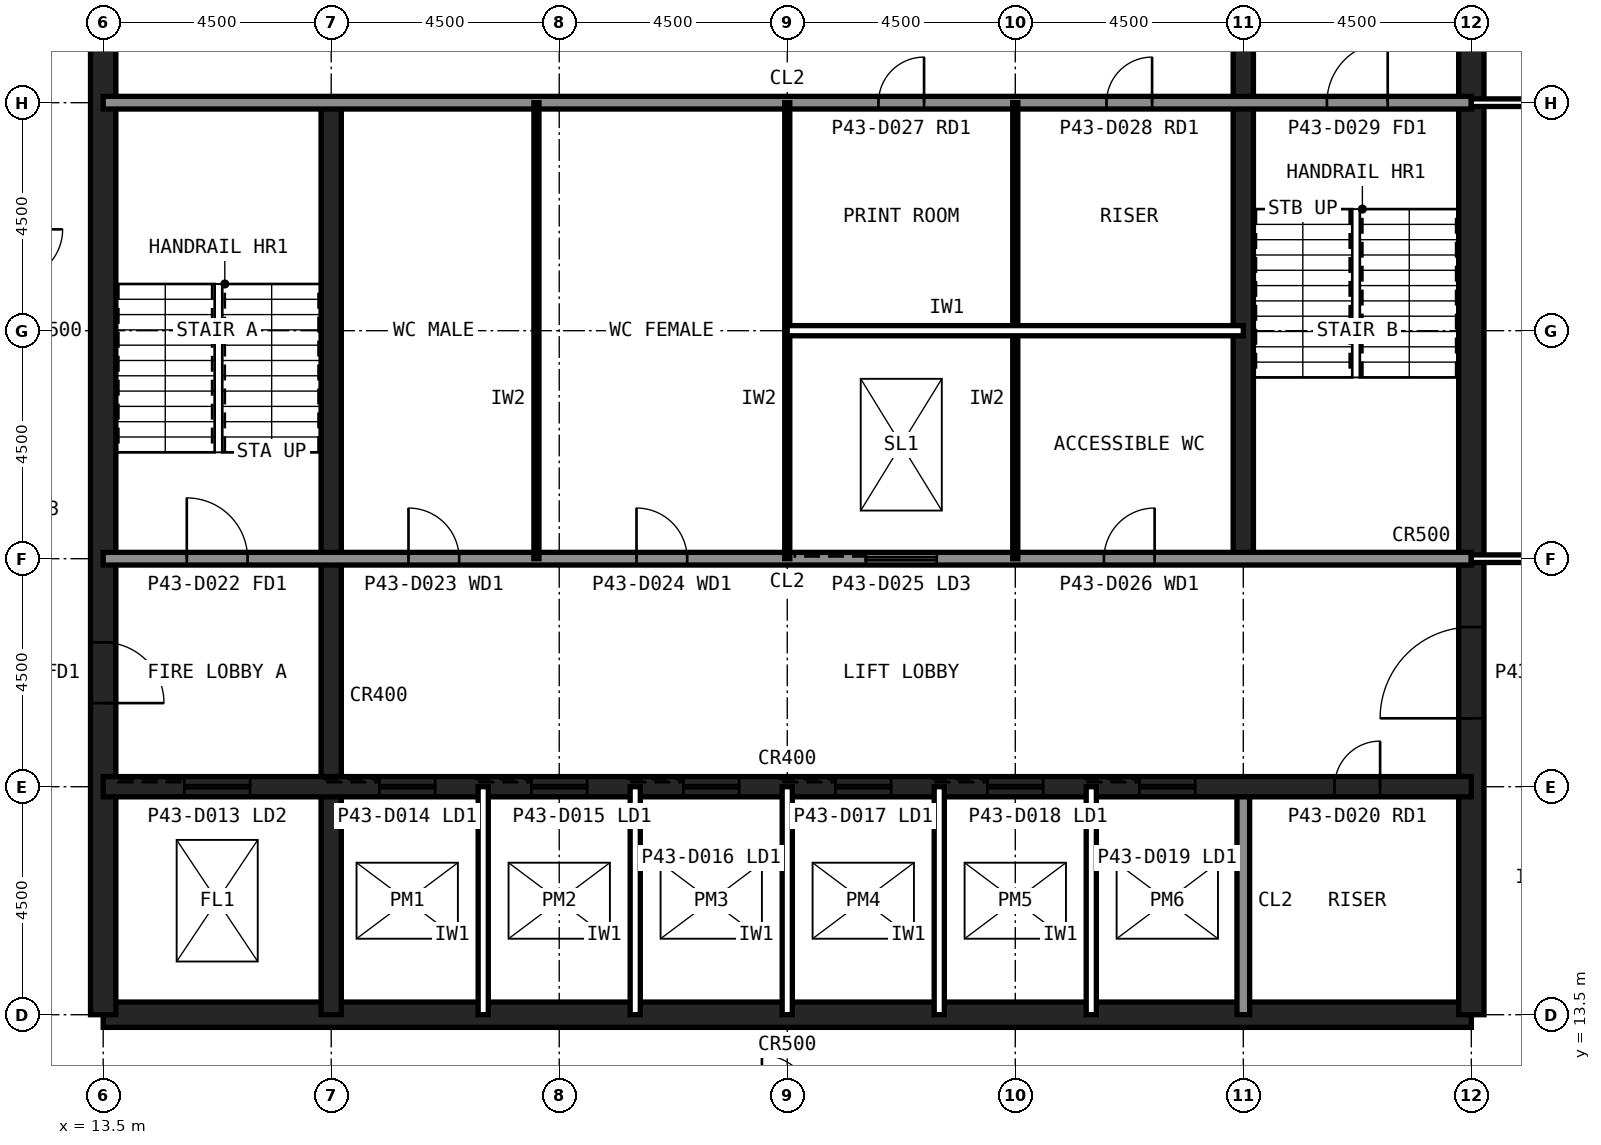
"""IFC4 building model, lengths in metres.
Left out: names, types, materials, properties, quantities, classifications, styles, units other than length and angle.
Written with IfcOpenShell. Run it as: python <this file> out.ifc"""

import sys

from ifc_helpers import new_model, si_unit, direction, frame, frame_2d, origin, place, context, subcontext, project, spatial, rectangle, extrude, element, fill, save


model = new_model("IFC4")
c1 = context("Model", 3, precision=1e-05, world=origin(), true_north=direction((0.0, 1.0)))
c2 = subcontext(c1, "Body", "Model", "MODEL_VIEW")
j1 = project(units=[si_unit("LENGTHUNIT", "METRE"), si_unit("PLANEANGLEUNIT", "RADIAN")], contexts=[c1])
p1 = place(None, origin())
s1 = spatial("IfcSite", under=j1, at=p1, CompositionType="ELEMENT")
p2 = place(p1, origin())
s2 = spatial("IfcBuilding", under=s1, at=p2, CompositionType="ELEMENT")
p3 = place(p2, frame((0.0, 0.0, 183.6)))
s3 = spatial("IfcBuildingStorey", under=s2, at=p3, CompositionType="ELEMENT", Elevation=183.6)
p4 = place(p3, frame((13.5, 13.5, 0.0), z_axis=(0.0, 0.0, 1.0), x_axis=(1.0, 0.0, 0.0)))
e1 = element("IfcWall", 1, at=p4, inside=s3, PredefinedType="SHEAR", context=c2, shape_type="SweptSolid", body=[
    extrude(rectangle(XDim=27.0, YDim=0.5, at=frame_2d((13.5, 0.0))), origin(), (0.0, 0.0, 1.0), 4.0),
])
p5 = place(p3, frame((40.5, 13.5, 0.0), z_axis=(0.0, 0.0, 1.0), x_axis=(0.0, 1.0, 0.0)))
e2 = element("IfcWall", 2, at=p5, inside=s3, PredefinedType="SHEAR", context=c2, shape_type="SweptSolid", body=[
    extrude(rectangle(XDim=27.0, YDim=0.5, at=frame_2d((13.5, 0.0))), origin(), (0.0, 0.0, 1.0), 4.0),
])
p6 = place(p5, frame((5.85, 0.0, 0.0)))
e3 = element("IfcOpeningElement", 3, at=p6, cuts=e2, PredefinedType="OPENING", context=c2, shape_type="SweptSolid", body=[
    extrude(rectangle(XDim=1.8, YDim=2.1, at=frame_2d((0.9, 1.05))), frame((0.0, 0.26, 0.0), z_axis=(0.0, -1.0, 0.0), x_axis=(1.0, 0.0, 0.0)), (0.0, 0.0, 1.0), 0.52),
])
p7 = place(p5, frame((19.65, 0.0, 0.0)))
e4 = element("IfcOpeningElement", 4, at=p7, cuts=e2, PredefinedType="OPENING", context=c2, shape_type="SweptSolid", body=[
    extrude(rectangle(XDim=1.2, YDim=2.1, at=frame_2d((0.6, 1.05))), frame((0.0, 0.26, 0.0), z_axis=(0.0, -1.0, 0.0), x_axis=(1.0, 0.0, 0.0)), (0.0, 0.0, 1.0), 0.52),
])
p8 = place(p3, frame((13.5, 40.5, 0.0), z_axis=(0.0, 0.0, 1.0), x_axis=(0.0, -1.0, 0.0)))
e5 = element("IfcWall", 5, at=p8, inside=s3, PredefinedType="SHEAR", context=c2, shape_type="SweptSolid", body=[
    extrude(rectangle(XDim=27.0, YDim=0.5, at=frame_2d((13.5, 0.0))), origin(), (0.0, 0.0, 1.0), 4.0),
])
p9 = place(p8, frame((19.65, 0.0, 0.0)))
e6 = element("IfcOpeningElement", 6, at=p9, cuts=e5, PredefinedType="OPENING", context=c2, shape_type="SweptSolid", body=[
    extrude(rectangle(XDim=1.2, YDim=2.1, at=frame_2d((0.6, 1.05))), frame((0.0, 0.26, 0.0), z_axis=(0.0, -1.0, 0.0), x_axis=(1.0, 0.0, 0.0)), (0.0, 0.0, 1.0), 0.52),
])
p10 = place(p8, frame((5.85, 0.0, 0.0)))
e7 = element("IfcOpeningElement", 7, at=p10, cuts=e5, PredefinedType="OPENING", context=c2, shape_type="SweptSolid", body=[
    extrude(rectangle(XDim=1.8, YDim=2.1, at=frame_2d((0.9, 1.05))), frame((0.0, 0.26, 0.0), z_axis=(0.0, -1.0, 0.0), x_axis=(1.0, 0.0, 0.0)), (0.0, 0.0, 1.0), 0.52),
])
p11 = place(p3, frame((18.0, 13.5, 0.0), z_axis=(0.0, 0.0, 1.0), x_axis=(0.0, 1.0, 0.0)))
e8 = element("IfcWall", 8, at=p11, inside=s3, PredefinedType="SHEAR", context=c2, shape_type="SweptSolid", body=[
    extrude(rectangle(XDim=18.0, YDim=0.4, at=frame_2d((9.0, 0.0))), origin(), (0.0, 0.0, 1.0), 4.0),
])
p12 = place(p3, frame((36.0, 13.5, 0.0), z_axis=(0.0, 0.0, 1.0), x_axis=(0.0, 1.0, 0.0)))
e9 = element("IfcWall", 9, at=p12, inside=s3, PredefinedType="SOLIDWALL", context=c2, shape_type="SweptSolid", body=[
    extrude(rectangle(XDim=4.5, YDim=0.25, at=frame_2d((2.25, 0.0))), origin(), (0.0, 0.0, 1.0), 3.84),
])
p13 = place(p3, frame((36.0, 22.5, 0.0), z_axis=(0.0, 0.0, 1.0), x_axis=(0.0, 1.0, 0.0)))
e10 = element("IfcWall", 10, at=p13, inside=s3, PredefinedType="SHEAR", context=c2, shape_type="SweptSolid", body=[
    extrude(rectangle(XDim=18.0, YDim=0.4, at=frame_2d((9.0, 0.0))), origin(), (0.0, 0.0, 1.0), 4.0),
])
p14 = place(p3, frame((13.5, 18.0, 0.0), z_axis=(0.0, 0.0, 1.0), x_axis=(1.0, 0.0, 0.0)))
e11 = element("IfcWall", 11, at=p14, inside=s3, PredefinedType="SHEAR", context=c2, shape_type="SweptSolid", body=[
    extrude(rectangle(XDim=27.0, YDim=0.4, at=frame_2d((13.5, 0.0))), origin(), (0.0, 0.0, 1.0), 4.0),
])
p15 = place(p14, frame((24.3, 0.0, 0.0)))
e12 = element("IfcOpeningElement", 12, at=p15, cuts=e11, PredefinedType="OPENING", context=c2, shape_type="SweptSolid", body=[
    extrude(rectangle(XDim=0.9, YDim=2.1, at=frame_2d((0.45, 1.05))), frame((0.0, 0.21, 0.0), z_axis=(0.0, -1.0, 0.0), x_axis=(1.0, 0.0, 0.0)), (0.0, 0.0, 1.0), 0.42),
])
p16 = place(p14, frame((5.45, 0.0, 0.0)))
e13 = element("IfcOpeningElement", 13, at=p16, cuts=e11, PredefinedType="OPENING", context=c2, shape_type="SweptSolid", body=[
    extrude(rectangle(XDim=1.1, YDim=2.1, at=frame_2d((0.55, 1.05))), frame((0.0, 0.21, 0.0), z_axis=(0.0, -1.0, 0.0), x_axis=(1.0, 0.0, 0.0)), (0.0, 0.0, 1.0), 0.42),
])
p17 = place(p14, frame((8.45, 0.0, 0.0)))
e14 = element("IfcOpeningElement", 14, at=p17, cuts=e11, PredefinedType="OPENING", context=c2, shape_type="SweptSolid", body=[
    extrude(rectangle(XDim=1.1, YDim=2.1, at=frame_2d((0.55, 1.05))), frame((0.0, 0.21, 0.0), z_axis=(0.0, -1.0, 0.0), x_axis=(1.0, 0.0, 0.0)), (0.0, 0.0, 1.0), 0.42),
])
p18 = place(p14, frame((11.45, 0.0, 0.0)))
e15 = element("IfcOpeningElement", 15, at=p18, cuts=e11, PredefinedType="OPENING", context=c2, shape_type="SweptSolid", body=[
    extrude(rectangle(XDim=1.1, YDim=2.1, at=frame_2d((0.55, 1.05))), frame((0.0, 0.21, 0.0), z_axis=(0.0, -1.0, 0.0), x_axis=(1.0, 0.0, 0.0)), (0.0, 0.0, 1.0), 0.42),
])
p19 = place(p14, frame((14.45, 0.0, 0.0)))
e16 = element("IfcOpeningElement", 16, at=p19, cuts=e11, PredefinedType="OPENING", context=c2, shape_type="SweptSolid", body=[
    extrude(rectangle(XDim=1.1, YDim=2.1, at=frame_2d((0.55, 1.05))), frame((0.0, 0.21, 0.0), z_axis=(0.0, -1.0, 0.0), x_axis=(1.0, 0.0, 0.0)), (0.0, 0.0, 1.0), 0.42),
])
p20 = place(p14, frame((17.45, 0.0, 0.0)))
e17 = element("IfcOpeningElement", 17, at=p20, cuts=e11, PredefinedType="OPENING", context=c2, shape_type="SweptSolid", body=[
    extrude(rectangle(XDim=1.1, YDim=2.1, at=frame_2d((0.55, 1.05))), frame((0.0, 0.21, 0.0), z_axis=(0.0, -1.0, 0.0), x_axis=(1.0, 0.0, 0.0)), (0.0, 0.0, 1.0), 0.42),
])
p21 = place(p14, frame((20.45, 0.0, 0.0)))
e18 = element("IfcOpeningElement", 18, at=p21, cuts=e11, PredefinedType="OPENING", context=c2, shape_type="SweptSolid", body=[
    extrude(rectangle(XDim=1.1, YDim=2.1, at=frame_2d((0.55, 1.05))), frame((0.0, 0.21, 0.0), z_axis=(0.0, -1.0, 0.0), x_axis=(1.0, 0.0, 0.0)), (0.0, 0.0, 1.0), 0.42),
])
p22 = place(p14, frame((1.6, 0.0, 0.0)))
e19 = element("IfcOpeningElement", 19, at=p22, cuts=e11, PredefinedType="OPENING", context=c2, shape_type="SweptSolid", body=[
    extrude(rectangle(XDim=1.3, YDim=2.2, at=frame_2d((0.65, 1.1))), frame((0.0, 0.21, 0.0), z_axis=(0.0, -1.0, 0.0), x_axis=(1.0, 0.0, 0.0)), (0.0, 0.0, 1.0), 0.42),
])
p23 = place(p3, frame((13.5, 22.5, 0.0), z_axis=(0.0, 0.0, 1.0), x_axis=(1.0, 0.0, 0.0)))
e20 = element("IfcWall", 20, at=p23, inside=s3, PredefinedType="SOLIDWALL", context=c2, shape_type="SweptSolid", body=[
    extrude(rectangle(XDim=27.0, YDim=0.25, at=frame_2d((13.5, 0.0))), origin(), (0.0, 0.0, 1.0), 3.84),
])
p24 = place(p23, frame((1.65, 0.0, 0.0)))
e21 = element("IfcOpeningElement", 21, at=p24, cuts=e20, PredefinedType="OPENING", context=c2, shape_type="SweptSolid", body=[
    extrude(rectangle(XDim=1.2, YDim=2.1, at=frame_2d((0.6, 1.05))), frame((0.0, 0.135, 0.0), z_axis=(0.0, -1.0, 0.0), x_axis=(1.0, 0.0, 0.0)), (0.0, 0.0, 1.0), 0.27),
])
p25 = place(p23, frame((6.025, 0.0, 0.0)))
e22 = element("IfcOpeningElement", 22, at=p25, cuts=e20, PredefinedType="OPENING", context=c2, shape_type="SweptSolid", body=[
    extrude(rectangle(XDim=1.0, YDim=2.1, at=frame_2d((0.5, 1.05))), frame((0.0, 0.135, 0.0), z_axis=(0.0, -1.0, 0.0), x_axis=(1.0, 0.0, 0.0)), (0.0, 0.0, 1.0), 0.27),
])
p26 = place(p23, frame((10.525, 0.0, 0.0)))
e23 = element("IfcOpeningElement", 23, at=p26, cuts=e20, PredefinedType="OPENING", context=c2, shape_type="SweptSolid", body=[
    extrude(rectangle(XDim=1.0, YDim=2.1, at=frame_2d((0.5, 1.05))), frame((0.0, 0.135, 0.0), z_axis=(0.0, -1.0, 0.0), x_axis=(1.0, 0.0, 0.0)), (0.0, 0.0, 1.0), 0.27),
])
p27 = place(p23, frame((19.75, 0.0, 0.0)))
e24 = element("IfcOpeningElement", 24, at=p27, cuts=e20, PredefinedType="OPENING", context=c2, shape_type="SweptSolid", body=[
    extrude(rectangle(XDim=1.0, YDim=2.1, at=frame_2d((0.5, 1.05))), frame((0.0, 0.135, 0.0), z_axis=(0.0, -1.0, 0.0), x_axis=(1.0, 0.0, 0.0)), (0.0, 0.0, 1.0), 0.27),
])
p28 = place(p23, frame((15.05, 0.0, 0.0)))
e25 = element("IfcOpeningElement", 25, at=p28, cuts=e20, PredefinedType="OPENING", context=c2, shape_type="SweptSolid", body=[
    extrude(rectangle(XDim=1.4, YDim=2.4, at=frame_2d((0.7, 1.2))), frame((0.0, 0.135, 0.0), z_axis=(0.0, -1.0, 0.0), x_axis=(1.0, 0.0, 0.0)), (0.0, 0.0, 1.0), 0.27),
])
p29 = place(p3, frame((13.5, 31.5, 0.0), z_axis=(0.0, 0.0, 1.0), x_axis=(1.0, 0.0, 0.0)))
e26 = element("IfcWall", 26, at=p29, inside=s3, PredefinedType="SOLIDWALL", context=c2, shape_type="SweptSolid", body=[
    extrude(rectangle(XDim=27.0, YDim=0.25, at=frame_2d((13.5, 0.0))), origin(), (0.0, 0.0, 1.0), 3.84),
])
p30 = place(p29, frame((24.15, 0.0, 0.0)))
e27 = element("IfcOpeningElement", 27, at=p30, cuts=e26, PredefinedType="OPENING", context=c2, shape_type="SweptSolid", body=[
    extrude(rectangle(XDim=1.2, YDim=2.1, at=frame_2d((0.6, 1.05))), frame((0.0, 0.135, 0.0), z_axis=(0.0, -1.0, 0.0), x_axis=(1.0, 0.0, 0.0)), (0.0, 0.0, 1.0), 0.27),
])
p31 = place(p29, frame((15.3, 0.0, 0.0)))
e28 = element("IfcOpeningElement", 28, at=p31, cuts=e26, PredefinedType="OPENING", context=c2, shape_type="SweptSolid", body=[
    extrude(rectangle(XDim=0.9, YDim=2.1, at=frame_2d((0.45, 1.05))), frame((0.0, 0.135, 0.0), z_axis=(0.0, -1.0, 0.0), x_axis=(1.0, 0.0, 0.0)), (0.0, 0.0, 1.0), 0.27),
])
p32 = place(p29, frame((19.8, 0.0, 0.0)))
e29 = element("IfcOpeningElement", 29, at=p32, cuts=e26, PredefinedType="OPENING", context=c2, shape_type="SweptSolid", body=[
    extrude(rectangle(XDim=0.9, YDim=2.1, at=frame_2d((0.45, 1.05))), frame((0.0, 0.135, 0.0), z_axis=(0.0, -1.0, 0.0), x_axis=(1.0, 0.0, 0.0)), (0.0, 0.0, 1.0), 0.27),
])
for number, where, z_axis, x_axis in (
    (30, (21.0, 13.5, 0.0), (0.0, 0.0, 1.0), (0.0, 1.0, 0.0)),
    (31, (24.0, 13.5, 0.0), (0.0, 0.0, 1.0), (0.0, 1.0, 0.0)),
    (32, (27.0, 13.5, 0.0), (0.0, 0.0, 1.0), (0.0, 1.0, 0.0)),
    (33, (30.0, 13.5, 0.0), (0.0, 0.0, 1.0), (0.0, 1.0, 0.0)),
    (34, (33.0, 13.5, 0.0), (0.0, 0.0, 1.0), (0.0, 1.0, 0.0)),
):
    element("IfcWall", number, at=place(p3, frame(where, z_axis=z_axis, x_axis=x_axis)), inside=s3, PredefinedType="PARTITIONING", context=c2, shape_type="SweptSolid", body=[
        extrude(rectangle(XDim=4.5, YDim=0.2, at=frame_2d((2.25, 0.0))), origin(), (0.0, 0.0, 1.0), 3.84),
    ])
for number, where, z_axis, x_axis in (
    (35, (22.05, 22.5, 0.0), (0.0, 0.0, 1.0), (0.0, 1.0, 0.0)),
    (36, (27.0, 22.5, 0.0), (0.0, 0.0, 1.0), (0.0, 1.0, 0.0)),
    (37, (31.5, 22.5, 0.0), (0.0, 0.0, 1.0), (0.0, 1.0, 0.0)),
):
    element("IfcWall", number, at=place(p3, frame(where, z_axis=z_axis, x_axis=x_axis)), inside=s3, PredefinedType="PLUMBINGWALL", context=c2, shape_type="SweptSolid", body=[
        extrude(rectangle(XDim=9.0, YDim=0.1, at=frame_2d((4.5, 0.0))), origin(), (0.0, 0.0, 1.0), 3.84),
    ])
p33 = place(p3, frame((27.0, 27.0, 0.0), z_axis=(0.0, 0.0, 1.0), x_axis=(1.0, 0.0, 0.0)))
e38 = element("IfcWall", 38, at=p33, inside=s3, PredefinedType="PARTITIONING", context=c2, shape_type="SweptSolid", body=[
    extrude(rectangle(XDim=9.0, YDim=0.2, at=frame_2d((4.5, 0.0))), origin(), (0.0, 0.0, 1.0), 3.84),
])
p34 = place(p3, frame((40.5, 22.5, 0.0), z_axis=(0.0, 0.0, 1.0), x_axis=(1.0, 0.0, 0.0)))
e39 = element("IfcWall", 39, at=p34, inside=s3, PredefinedType="PARTITIONING", context=c2, shape_type="SweptSolid", body=[
    extrude(rectangle(XDim=6.75, YDim=0.15, at=frame_2d((3.375, 0.0))), origin(), (0.0, 0.0, 1.0), 2.989),
])
p35 = place(p3, frame((47.25, 31.5, 0.0), z_axis=(0.0, 0.0, 1.0), x_axis=(-1.0, 0.0, 0.0)))
e40 = element("IfcWall", 40, at=p35, inside=s3, PredefinedType="PARTITIONING", context=c2, shape_type="SweptSolid", body=[
    extrude(rectangle(XDim=6.75, YDim=0.15, at=frame_2d((3.375, 0.0))), origin(), (0.0, 0.0, 1.0), 2.989),
])
p36 = place(p35, frame((2.875, 0.0, 0.0)))
e41 = element("IfcOpeningElement", 41, at=p36, cuts=e40, PredefinedType="OPENING", context=c2, shape_type="SweptSolid", body=[
    extrude(rectangle(XDim=1.0, YDim=2.1, at=frame_2d((0.5, 1.05))), frame((0.0, 0.085, 0.0), z_axis=(0.0, -1.0, 0.0), x_axis=(1.0, 0.0, 0.0)), (0.0, 0.0, 1.0), 0.17),
])
p37 = place(p9, origin())
e42 = element("IfcDoor", 42, at=p37, inside=s3, OperationType="SINGLE_SWING_RIGHT", PredefinedType="DOOR", context=c2, shape_type="SweptSolid", body=[
    extrude(rectangle(XDim=1.2, YDim=2.1, at=frame_2d((0.6, 1.05))), frame((0.0, 0.025, 0.0), z_axis=(0.0, -1.0, 0.0), x_axis=(1.0, 0.0, 0.0)), (0.0, 0.0, 1.0), 0.05),
])
fill(e6, e42)
p38 = place(p6, origin())
e43 = element("IfcDoor", 43, at=p38, inside=s3, OperationType="SINGLE_SWING_LEFT", PredefinedType="DOOR", context=c2, shape_type="SweptSolid", body=[
    extrude(rectangle(XDim=1.8, YDim=2.1, at=frame_2d((0.9, 1.05))), frame((0.0, 0.025, 0.0), z_axis=(0.0, -1.0, 0.0), x_axis=(1.0, 0.0, 0.0)), (0.0, 0.0, 1.0), 0.05),
])
fill(e3, e43)
p39 = place(p24, origin())
e44 = element("IfcDoor", 44, at=p39, inside=s3, OperationType="SINGLE_SWING_LEFT", PredefinedType="DOOR", context=c2, shape_type="SweptSolid", body=[
    extrude(rectangle(XDim=1.2, YDim=2.1, at=frame_2d((0.6, 1.05))), frame((0.0, 0.025, 0.0), z_axis=(0.0, -1.0, 0.0), x_axis=(1.0, 0.0, 0.0)), (0.0, 0.0, 1.0), 0.05),
])
fill(e21, e44)
p40 = place(p30, origin())
e45 = element("IfcDoor", 45, at=p40, inside=s3, OperationType="SINGLE_SWING_RIGHT", PredefinedType="DOOR", context=c2, shape_type="SweptSolid", body=[
    extrude(rectangle(XDim=1.2, YDim=2.1, at=frame_2d((0.6, 1.05))), frame((0.0, 0.025, 0.0), z_axis=(0.0, -1.0, 0.0), x_axis=(1.0, 0.0, 0.0)), (0.0, 0.0, 1.0), 0.05),
])
fill(e27, e45)
p41 = place(p25, origin())
e46 = element("IfcDoor", 46, at=p41, inside=s3, OperationType="SINGLE_SWING_LEFT", PredefinedType="DOOR", context=c2, shape_type="SweptSolid", body=[
    extrude(rectangle(XDim=1.0, YDim=2.1, at=frame_2d((0.5, 1.05))), frame((0.0, 0.025, 0.0), z_axis=(0.0, -1.0, 0.0), x_axis=(1.0, 0.0, 0.0)), (0.0, 0.0, 1.0), 0.05),
])
fill(e22, e46)
p42 = place(p26, origin())
e47 = element("IfcDoor", 47, at=p42, inside=s3, OperationType="SINGLE_SWING_LEFT", PredefinedType="DOOR", context=c2, shape_type="SweptSolid", body=[
    extrude(rectangle(XDim=1.0, YDim=2.1, at=frame_2d((0.5, 1.05))), frame((0.0, 0.025, 0.0), z_axis=(0.0, -1.0, 0.0), x_axis=(1.0, 0.0, 0.0)), (0.0, 0.0, 1.0), 0.05),
])
fill(e23, e47)
p43 = place(p27, origin())
e48 = element("IfcDoor", 48, at=p43, inside=s3, OperationType="SINGLE_SWING_RIGHT", PredefinedType="DOOR", context=c2, shape_type="SweptSolid", body=[
    extrude(rectangle(XDim=1.0, YDim=2.1, at=frame_2d((0.5, 1.05))), frame((0.0, 0.025, 0.0), z_axis=(0.0, -1.0, 0.0), x_axis=(1.0, 0.0, 0.0)), (0.0, 0.0, 1.0), 0.05),
])
fill(e24, e48)
p44 = place(p31, origin())
e49 = element("IfcDoor", 49, at=p44, inside=s3, OperationType="SINGLE_SWING_RIGHT", PredefinedType="DOOR", context=c2, shape_type="SweptSolid", body=[
    extrude(rectangle(XDim=0.9, YDim=2.1, at=frame_2d((0.45, 1.05))), frame((0.0, 0.025, 0.0), z_axis=(0.0, -1.0, 0.0), x_axis=(1.0, 0.0, 0.0)), (0.0, 0.0, 1.0), 0.05),
])
fill(e28, e49)
p45 = place(p32, origin())
e50 = element("IfcDoor", 50, at=p45, inside=s3, OperationType="SINGLE_SWING_RIGHT", PredefinedType="DOOR", context=c2, shape_type="SweptSolid", body=[
    extrude(rectangle(XDim=0.9, YDim=2.1, at=frame_2d((0.45, 1.05))), frame((0.0, 0.025, 0.0), z_axis=(0.0, -1.0, 0.0), x_axis=(1.0, 0.0, 0.0)), (0.0, 0.0, 1.0), 0.05),
])
fill(e29, e50)
p46 = place(p15, origin())
e51 = element("IfcDoor", 51, at=p46, inside=s3, OperationType="SINGLE_SWING_RIGHT", PredefinedType="DOOR", context=c2, shape_type="SweptSolid", body=[
    extrude(rectangle(XDim=0.9, YDim=2.1, at=frame_2d((0.45, 1.05))), frame((0.0, 0.025, 0.0), z_axis=(0.0, -1.0, 0.0), x_axis=(1.0, 0.0, 0.0)), (0.0, 0.0, 1.0), 0.05),
])
fill(e12, e51)
p47 = place(p16, origin())
e52 = element("IfcDoor", 52, at=p47, inside=s3, OperationType="SLIDING_TO_LEFT", PredefinedType="DOOR", context=c2, shape_type="SweptSolid", body=[
    extrude(rectangle(XDim=1.1, YDim=2.1, at=frame_2d((0.55, 1.05))), frame((0.0, 0.025, 0.0), z_axis=(0.0, -1.0, 0.0), x_axis=(1.0, 0.0, 0.0)), (0.0, 0.0, 1.0), 0.05),
])
fill(e13, e52)
p48 = place(p17, origin())
e53 = element("IfcDoor", 53, at=p48, inside=s3, OperationType="SLIDING_TO_LEFT", PredefinedType="DOOR", context=c2, shape_type="SweptSolid", body=[
    extrude(rectangle(XDim=1.1, YDim=2.1, at=frame_2d((0.55, 1.05))), frame((0.0, 0.025, 0.0), z_axis=(0.0, -1.0, 0.0), x_axis=(1.0, 0.0, 0.0)), (0.0, 0.0, 1.0), 0.05),
])
fill(e14, e53)
p49 = place(p18, origin())
e54 = element("IfcDoor", 54, at=p49, inside=s3, OperationType="SLIDING_TO_LEFT", PredefinedType="DOOR", context=c2, shape_type="SweptSolid", body=[
    extrude(rectangle(XDim=1.1, YDim=2.1, at=frame_2d((0.55, 1.05))), frame((0.0, 0.025, 0.0), z_axis=(0.0, -1.0, 0.0), x_axis=(1.0, 0.0, 0.0)), (0.0, 0.0, 1.0), 0.05),
])
fill(e15, e54)
p50 = place(p19, origin())
e55 = element("IfcDoor", 55, at=p50, inside=s3, OperationType="SLIDING_TO_LEFT", PredefinedType="DOOR", context=c2, shape_type="SweptSolid", body=[
    extrude(rectangle(XDim=1.1, YDim=2.1, at=frame_2d((0.55, 1.05))), frame((0.0, 0.025, 0.0), z_axis=(0.0, -1.0, 0.0), x_axis=(1.0, 0.0, 0.0)), (0.0, 0.0, 1.0), 0.05),
])
fill(e16, e55)
p51 = place(p20, origin())
e56 = element("IfcDoor", 56, at=p51, inside=s3, OperationType="SLIDING_TO_LEFT", PredefinedType="DOOR", context=c2, shape_type="SweptSolid", body=[
    extrude(rectangle(XDim=1.1, YDim=2.1, at=frame_2d((0.55, 1.05))), frame((0.0, 0.025, 0.0), z_axis=(0.0, -1.0, 0.0), x_axis=(1.0, 0.0, 0.0)), (0.0, 0.0, 1.0), 0.05),
])
fill(e17, e56)
p52 = place(p21, origin())
e57 = element("IfcDoor", 57, at=p52, inside=s3, OperationType="SLIDING_TO_LEFT", PredefinedType="DOOR", context=c2, shape_type="SweptSolid", body=[
    extrude(rectangle(XDim=1.1, YDim=2.1, at=frame_2d((0.55, 1.05))), frame((0.0, 0.025, 0.0), z_axis=(0.0, -1.0, 0.0), x_axis=(1.0, 0.0, 0.0)), (0.0, 0.0, 1.0), 0.05),
])
fill(e18, e57)
p53 = place(p22, origin())
e58 = element("IfcDoor", 58, at=p53, inside=s3, OperationType="SLIDING_TO_LEFT", PredefinedType="DOOR", context=c2, shape_type="SweptSolid", body=[
    extrude(rectangle(XDim=1.3, YDim=2.2, at=frame_2d((0.65, 1.1))), frame((0.0, 0.025, 0.0), z_axis=(0.0, -1.0, 0.0), x_axis=(1.0, 0.0, 0.0)), (0.0, 0.0, 1.0), 0.05),
])
fill(e19, e58)
p54 = place(p28, origin())
e59 = element("IfcDoor", 59, at=p54, inside=s3, OperationType="SLIDING_TO_LEFT", PredefinedType="DOOR", context=c2, shape_type="SweptSolid", body=[
    extrude(rectangle(XDim=1.4, YDim=2.4, at=frame_2d((0.7, 1.2))), frame((0.0, 0.025, 0.0), z_axis=(0.0, -1.0, 0.0), x_axis=(1.0, 0.0, 0.0)), (0.0, 0.0, 1.0), 0.05),
])
fill(e25, e59)
save(model, sys.argv[1])
